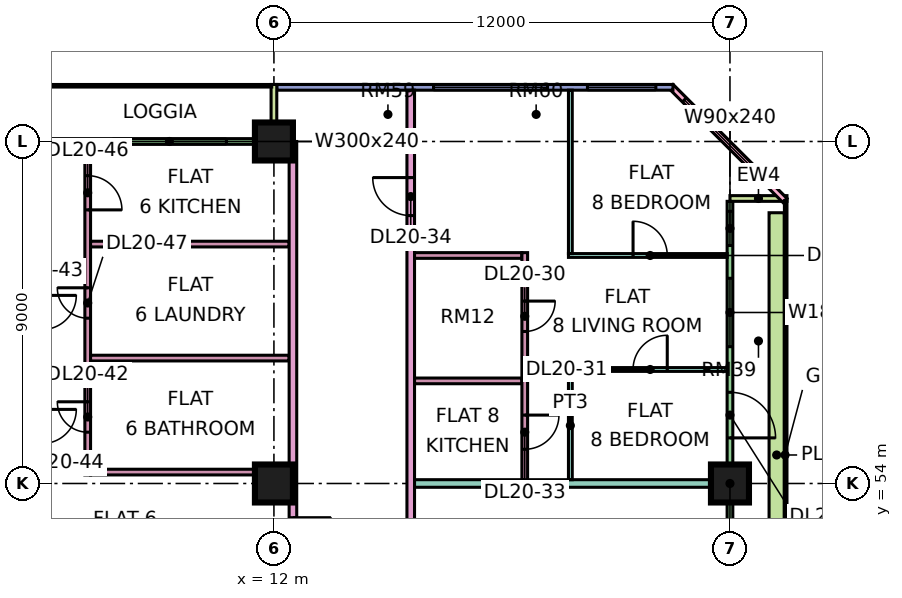
"""IFC4 building model, lengths in metres.
Left out: names, types, materials, properties, quantities, classifications, styles, units other than length and angle.
Written with IfcOpenShell. Run it as: python <this file> out.ifc"""

import sys

from ifc_helpers import new_model, si_unit, direction, frame, frame_2d, origin, origin_2d, place, context, subcontext, project, spatial, rectangle, extrude, element, fill, save


model = new_model("IFC4")
c1 = context("Model", 3, precision=1e-05, world=origin(), true_north=direction((0.0, 1.0)))
c2 = subcontext(c1, "Body", "Model", "MODEL_VIEW")
j1 = project(units=[si_unit("LENGTHUNIT", "METRE"), si_unit("PLANEANGLEUNIT", "RADIAN")], contexts=[c1])
p1 = place(None, origin())
s1 = spatial("IfcSite", under=j1, at=p1, CompositionType="ELEMENT")
p2 = place(p1, origin())
s2 = spatial("IfcBuilding", under=s1, at=p2, CompositionType="ELEMENT")
p3 = place(p2, frame((0.0, 0.0, 91.9)))
s3 = spatial("IfcBuildingStorey", under=s2, at=p3, CompositionType="ELEMENT", Elevation=91.9)
for number, where, z_axis, x_axis in (
    (1, (12.0, 54.0, 0.0), (0.0, 0.0, 1.0), (1.0, 0.0, 0.0)),
    (2, (12.0, 63.0, 0.0), (0.0, 0.0, 1.0), (1.0, 0.0, 0.0)),
    (3, (24.0, 54.0, 0.0), (0.0, 0.0, 1.0), (1.0, 0.0, 0.0)),
):
    element("IfcColumn", number, at=place(p3, frame(where, z_axis=z_axis, x_axis=x_axis)), inside=s3, PredefinedType="COLUMN", context=c2, shape_type="SweptSolid", body=[
        extrude(rectangle(XDim=1.0, YDim=1.0, at=origin_2d()), origin(), (0.0, 0.0, 1.0), 3.75),
    ])
p4 = place(p3, frame((24.0, 48.075, 0.0), z_axis=(0.0, 0.0, 1.0), x_axis=(0.0, 1.0, 0.0)))
e4 = element("IfcWall", 4, at=p4, inside=s3, PredefinedType="SOLIDWALL", context=c2, shape_type="SweptSolid", body=[
    extrude(rectangle(XDim=13.35, YDim=0.15, at=frame_2d((6.675, 0.0))), origin(), (0.0, 0.0, 1.0), 3.35),
])
p5 = place(p4, frame((0.562, 0.0, 0.45)))
e5 = element("IfcOpeningElement", 5, at=p5, cuts=e4, PredefinedType="OPENING", context=c2, shape_type="SweptSolid", body=[
    extrude(rectangle(XDim=4.2, YDim=2.4, at=frame_2d((2.1, 1.2))), frame((0.0, 0.085, 0.0), z_axis=(0.0, -1.0, 0.0), x_axis=(1.0, 0.0, 0.0)), (0.0, 0.0, 1.0), 0.17),
])
p6 = place(p4, frame((7.125, 0.0, 0.0)))
e6 = element("IfcOpeningElement", 6, at=p6, cuts=e4, PredefinedType="OPENING", context=c2, shape_type="SweptSolid", body=[
    extrude(rectangle(XDim=1.2, YDim=2.4, at=frame_2d((0.6, 1.2))), frame((0.0, 0.085, 0.0), z_axis=(0.0, -1.0, 0.0), x_axis=(1.0, 0.0, 0.0)), (0.0, 0.0, 1.0), 0.17),
])
p7 = place(p4, frame((9.525, 0.0, 0.45)))
e7 = element("IfcOpeningElement", 7, at=p7, cuts=e4, PredefinedType="OPENING", context=c2, shape_type="SweptSolid", body=[
    extrude(rectangle(XDim=1.8, YDim=2.4, at=frame_2d((0.9, 1.2))), frame((0.0, 0.085, 0.0), z_axis=(0.0, -1.0, 0.0), x_axis=(1.0, 0.0, 0.0)), (0.0, 0.0, 1.0), 0.17),
])
p8 = place(p4, frame((12.188, 0.0, 0.45)))
e8 = element("IfcOpeningElement", 8, at=p8, cuts=e4, PredefinedType="OPENING", context=c2, shape_type="SweptSolid", body=[
    extrude(rectangle(XDim=0.9, YDim=2.4, at=frame_2d((0.45, 1.2))), frame((0.0, 0.085, 0.0), z_axis=(0.0, -1.0, 0.0), x_axis=(1.0, 0.0, 0.0)), (0.0, 0.0, 1.0), 0.17),
])
p9 = place(p3, frame((25.5, 61.5, 0.0), z_axis=(0.0, 0.0, 1.0), x_axis=(-1.0, 0.0, 0.0)))
e9 = element("IfcWall", 9, at=p9, inside=s3, PredefinedType="SOLIDWALL", context=c2, shape_type="SweptSolid", body=[
    extrude(rectangle(XDim=1.5, YDim=0.15, at=frame_2d((0.75, 0.0))), origin(), (0.0, 0.0, 1.0), 3.35),
])
p10 = place(p3, frame((25.447, 61.447, 0.0), z_axis=(0.0, 0.0, 1.0), x_axis=(-0.707106781187, 0.707106781187, 0.0)))
e10 = element("IfcWall", 10, at=p10, inside=s3, PredefinedType="SOLIDWALL", context=c2, shape_type="SweptSolid", body=[
    extrude(rectangle(XDim=4.243, YDim=0.15, at=frame_2d((2.121, 0.0))), origin(), (0.0, 0.0, 1.0), 3.35),
])
p11 = place(p10, frame((0.744, 0.0, 0.45)))
e11 = element("IfcOpeningElement", 11, at=p11, cuts=e10, PredefinedType="OPENING", context=c2, shape_type="SweptSolid", body=[
    extrude(rectangle(XDim=3.0, YDim=2.4, at=frame_2d((1.5, 1.2))), frame((0.0, 0.085, 0.0), z_axis=(0.0, -1.0, 0.0), x_axis=(1.0, 0.0, 0.0)), (0.0, 0.0, 1.0), 0.17),
])
p12 = place(p3, frame((22.5, 64.425, 0.0), z_axis=(0.0, 0.0, 1.0), x_axis=(-1.0, 0.0, 0.0)))
e12 = element("IfcWall", 12, at=p12, inside=s3, PredefinedType="SOLIDWALL", context=c2, shape_type="SweptSolid", body=[
    extrude(rectangle(XDim=10.425, YDim=0.15, at=frame_2d((5.212, 0.0))), origin(), (0.0, 0.0, 1.0), 3.35),
])
p13 = place(p12, frame((0.45, 0.0, 0.45)))
e13 = element("IfcOpeningElement", 13, at=p13, cuts=e12, PredefinedType="OPENING", context=c2, shape_type="SweptSolid", body=[
    extrude(rectangle(XDim=1.8, YDim=2.4, at=frame_2d((0.9, 1.2))), frame((0.0, 0.085, 0.0), z_axis=(0.0, -1.0, 0.0), x_axis=(1.0, 0.0, 0.0)), (0.0, 0.0, 1.0), 0.17),
])
p14 = place(p12, frame((3.3, 0.0, 0.45)))
e14 = element("IfcOpeningElement", 14, at=p14, cuts=e12, PredefinedType="OPENING", context=c2, shape_type="SweptSolid", body=[
    extrude(rectangle(XDim=3.0, YDim=2.4, at=frame_2d((1.5, 1.2))), frame((0.0, 0.085, 0.0), z_axis=(0.0, -1.0, 0.0), x_axis=(1.0, 0.0, 0.0)), (0.0, 0.0, 1.0), 0.17),
])
p15 = place(p3, frame((11.925, 63.0, 0.0), z_axis=(0.0, 0.0, 1.0), x_axis=(-1.0, 0.0, 0.0)))
e15 = element("IfcWall", 15, at=p15, inside=s3, PredefinedType="SOLIDWALL", context=c2, shape_type="SweptSolid", body=[
    extrude(rectangle(XDim=10.35, YDim=0.15, at=frame_2d((5.175, 0.0))), origin(), (0.0, 0.0, 1.0), 3.35),
])
p16 = place(p15, frame((1.175, 0.0, 0.45)))
e16 = element("IfcOpeningElement", 16, at=p16, cuts=e15, PredefinedType="OPENING", context=c2, shape_type="SweptSolid", body=[
    extrude(rectangle(XDim=3.0, YDim=2.4, at=frame_2d((1.5, 1.2))), frame((0.0, 0.085, 0.0), z_axis=(0.0, -1.0, 0.0), x_axis=(1.0, 0.0, 0.0)), (0.0, 0.0, 1.0), 0.17),
])
p17 = place(p15, frame((6.688, 0.0, 0.0)))
e17 = element("IfcOpeningElement", 17, at=p17, cuts=e15, PredefinedType="OPENING", context=c2, shape_type="SweptSolid", body=[
    extrude(rectangle(XDim=1.8, YDim=2.4, at=frame_2d((0.9, 1.2))), frame((0.0, 0.085, 0.0), z_axis=(0.0, -1.0, 0.0), x_axis=(1.0, 0.0, 0.0)), (0.0, 0.0, 1.0), 0.17),
])
p18 = place(p3, frame((12.0, 64.5, 0.0), z_axis=(0.0, 0.0, 1.0), x_axis=(0.0, -1.0, 0.0)))
e18 = element("IfcWall", 18, at=p18, inside=s3, PredefinedType="SOLIDWALL", context=c2, shape_type="SweptSolid", body=[
    extrude(rectangle(XDim=1.5, YDim=0.15, at=frame_2d((0.75, 0.0))), origin(), (0.0, 0.0, 1.0), 3.35),
])
p19 = place(p3, frame((25.229, 48.375, 0.0), z_axis=(0.0, 0.0, 1.0), x_axis=(0.0, 1.0, 0.0)))
e19 = element("IfcWall", 19, at=p19, inside=s3, PredefinedType="SOLIDWALL", context=c2, shape_type="SweptSolid", body=[
    extrude(rectangle(XDim=12.75, YDim=0.4, at=frame_2d((6.375, 0.0))), origin(), (0.0, 0.0, 1.0), 0.7),
])
p20 = place(p3, frame((7.1, 54.225, 0.0), z_axis=(0.0, 0.0, 1.0), x_axis=(0.0, 1.0, 0.0)))
e20 = element("IfcWall", 20, at=p20, inside=s3, PredefinedType="PARTITIONING", context=c2, shape_type="SweptSolid", body=[
    extrude(rectangle(XDim=8.701, YDim=0.15, at=frame_2d((4.351, 0.0))), origin(), (0.0, 0.0, 1.0), 3.35),
])
p21 = place(p20, frame((1.125, 0.0, 0.0)))
e21 = element("IfcOpeningElement", 21, at=p21, cuts=e20, PredefinedType="OPENING", context=c2, shape_type="SweptSolid", body=[
    extrude(rectangle(XDim=0.8, YDim=2.1, at=frame_2d((0.4, 1.05))), frame((0.0, 0.085, 0.0), z_axis=(0.0, -1.0, 0.0), x_axis=(1.0, 0.0, 0.0)), (0.0, 0.0, 1.0), 0.17),
])
p22 = place(p20, frame((6.975, 0.0, 0.0)))
e22 = element("IfcOpeningElement", 22, at=p22, cuts=e20, PredefinedType="OPENING", context=c2, shape_type="SweptSolid", body=[
    extrude(rectangle(XDim=0.9, YDim=2.1, at=frame_2d((0.45, 1.05))), frame((0.0, 0.085, 0.0), z_axis=(0.0, -1.0, 0.0), x_axis=(1.0, 0.0, 0.0)), (0.0, 0.0, 1.0), 0.17),
])
p23 = place(p20, frame((4.125, 0.0, 0.0)))
e23 = element("IfcOpeningElement", 23, at=p23, cuts=e20, PredefinedType="OPENING", context=c2, shape_type="SweptSolid", body=[
    extrude(rectangle(XDim=0.8, YDim=2.1, at=frame_2d((0.4, 1.05))), frame((0.0, 0.085, 0.0), z_axis=(0.0, -1.0, 0.0), x_axis=(1.0, 0.0, 0.0)), (0.0, 0.0, 1.0), 0.17),
])
for number, where, z_axis, x_axis in (
    (24, (7.175, 54.3, 0.0), (0.0, 0.0, 1.0), (1.0, 0.0, 0.0)),
    (25, (7.175, 57.3, 0.0), (0.0, 0.0, 1.0), (1.0, 0.0, 0.0)),
    (26, (7.175, 60.3, 0.0), (0.0, 0.0, 1.0), (1.0, 0.0, 0.0)),
):
    element("IfcWall", number, at=place(p3, frame(where, z_axis=z_axis, x_axis=x_axis)), inside=s3, PredefinedType="PARTITIONING", context=c2, shape_type="SweptSolid", body=[
        extrude(rectangle(XDim=5.225, YDim=0.15, at=frame_2d((2.612, 0.0))), origin(), (0.0, 0.0, 1.0), 3.35),
    ])
p24 = place(p3, frame((12.5, 20.0, 0.0), z_axis=(0.0, 0.0, 1.0), x_axis=(0.0, 1.0, 0.0)))
e27 = element("IfcWall", 27, at=p24, inside=s3, PredefinedType="PARTITIONING", context=c2, shape_type="SweptSolid", body=[
    extrude(rectangle(XDim=43.0, YDim=0.2, at=frame_2d((21.5, 0.0))), origin(), (0.0, 0.0, 1.0), 3.35),
])
p25 = place(p24, frame((28.65, 0.0, 0.0)))
e28 = element("IfcOpeningElement", 28, at=p25, cuts=e27, PredefinedType="OPENING", context=c2, shape_type="SweptSolid", body=[
    extrude(rectangle(XDim=1.0, YDim=2.1, at=frame_2d((0.5, 1.05))), frame((0.0, 0.11, 0.0), z_axis=(0.0, -1.0, 0.0), x_axis=(1.0, 0.0, 0.0)), (0.0, 0.0, 1.0), 0.22),
])
p26 = place(p24, frame((32.1, 0.0, 0.0)))
e29 = element("IfcOpeningElement", 29, at=p26, cuts=e27, PredefinedType="OPENING", context=c2, shape_type="SweptSolid", body=[
    extrude(rectangle(XDim=1.0, YDim=2.1, at=frame_2d((0.5, 1.05))), frame((0.0, 0.11, 0.0), z_axis=(0.0, -1.0, 0.0), x_axis=(1.0, 0.0, 0.0)), (0.0, 0.0, 1.0), 0.22),
])
p27 = place(p24, frame((0.6, 0.0, 0.0)))
e30 = element("IfcOpeningElement", 30, at=p27, cuts=e27, PredefinedType="OPENING", context=c2, shape_type="SweptSolid", body=[
    extrude(rectangle(XDim=1.2, YDim=2.1, at=frame_2d((0.6, 1.05))), frame((0.0, 0.11, 0.0), z_axis=(0.0, -1.0, 0.0), x_axis=(1.0, 0.0, 0.0)), (0.0, 0.0, 1.0), 0.22),
])
p28 = place(p24, frame((11.1, 0.0, 0.0)))
e31 = element("IfcOpeningElement", 31, at=p28, cuts=e27, PredefinedType="OPENING", context=c2, shape_type="SweptSolid", body=[
    extrude(rectangle(XDim=1.0, YDim=2.1, at=frame_2d((0.5, 1.05))), frame((0.0, 0.11, 0.0), z_axis=(0.0, -1.0, 0.0), x_axis=(1.0, 0.0, 0.0)), (0.0, 0.0, 1.0), 0.22),
])
p29 = place(p3, frame((15.6, 51.225, 0.0), z_axis=(0.0, 0.0, 1.0), x_axis=(0.0, 1.0, 0.0)))
e32 = element("IfcWall", 32, at=p29, inside=s3, PredefinedType="PARTITIONING", context=c2, shape_type="SweptSolid", body=[
    extrude(rectangle(XDim=13.125, YDim=0.2, at=frame_2d((6.562, 0.0))), origin(), (0.0, 0.0, 1.0), 3.35),
])
p30 = place(p29, frame((9.825, 0.0, 0.0)))
e33 = element("IfcOpeningElement", 33, at=p30, cuts=e32, PredefinedType="OPENING", context=c2, shape_type="SweptSolid", body=[
    extrude(rectangle(XDim=1.0, YDim=2.1, at=frame_2d((0.5, 1.05))), frame((0.0, 0.11, 0.0), z_axis=(0.0, -1.0, 0.0), x_axis=(1.0, 0.0, 0.0)), (0.0, 0.0, 1.0), 0.22),
])
p31 = place(p3, frame((15.7, 54.0, 0.0), z_axis=(0.0, 0.0, 1.0), x_axis=(1.0, 0.0, 0.0)))
e34 = element("IfcWall", 34, at=p31, inside=s3, PredefinedType="PARTITIONING", context=c2, shape_type="SweptSolid", body=[
    extrude(rectangle(XDim=8.226, YDim=0.2, at=frame_2d((4.113, 0.0))), origin(), (0.0, 0.0, 1.0), 3.35),
])
for number, where, z_axis, x_axis in (
    (35, (15.7, 56.7, 0.0), (0.0, 0.0, 1.0), (1.0, 0.0, 0.0)),
    (36, (15.7, 60.0, 0.0), (0.0, 0.0, 1.0), (1.0, 0.0, 0.0)),
):
    element("IfcWall", number, at=place(p3, frame(where, z_axis=z_axis, x_axis=x_axis)), inside=s3, PredefinedType="PARTITIONING", context=c2, shape_type="SweptSolid", body=[
        extrude(rectangle(XDim=2.825, YDim=0.15, at=frame_2d((1.413, 0.0))), origin(), (0.0, 0.0, 1.0), 3.35),
    ])
p32 = place(p3, frame((18.6, 54.1, 0.0), z_axis=(0.0, 0.0, 1.0), x_axis=(0.0, 1.0, 0.0)))
e37 = element("IfcWall", 37, at=p32, inside=s3, PredefinedType="PARTITIONING", context=c2, shape_type="SweptSolid", body=[
    extrude(rectangle(XDim=5.975, YDim=0.15, at=frame_2d((2.987, 0.0))), origin(), (0.0, 0.0, 1.0), 3.35),
])
p33 = place(p32, frame((3.9, 0.0, 0.0)))
e38 = element("IfcOpeningElement", 38, at=p33, cuts=e37, PredefinedType="OPENING", context=c2, shape_type="SweptSolid", body=[
    extrude(rectangle(XDim=0.8, YDim=2.1, at=frame_2d((0.4, 1.05))), frame((0.0, 0.085, 0.0), z_axis=(0.0, -1.0, 0.0), x_axis=(1.0, 0.0, 0.0)), (0.0, 0.0, 1.0), 0.17),
])
p34 = place(p32, frame((0.8, 0.0, 0.0)))
e39 = element("IfcOpeningElement", 39, at=p34, cuts=e37, PredefinedType="OPENING", context=c2, shape_type="SweptSolid", body=[
    extrude(rectangle(XDim=0.9, YDim=2.1, at=frame_2d((0.45, 1.05))), frame((0.0, 0.085, 0.0), z_axis=(0.0, -1.0, 0.0), x_axis=(1.0, 0.0, 0.0)), (0.0, 0.0, 1.0), 0.17),
])
p35 = place(p3, frame((19.75, 57.0, 0.0), z_axis=(0.0, 0.0, 1.0), x_axis=(1.0, 0.0, 0.0)))
e40 = element("IfcWall", 40, at=p35, inside=s3, PredefinedType="PARTITIONING", context=c2, shape_type="SweptSolid", body=[
    extrude(rectangle(XDim=4.176, YDim=0.1, at=frame_2d((2.088, 0.0))), origin(), (0.0, 0.0, 1.0), 3.35),
])
p36 = place(p35, frame((1.7, 0.0, 0.0)))
e41 = element("IfcOpeningElement", 41, at=p36, cuts=e40, PredefinedType="OPENING", context=c2, shape_type="SweptSolid", body=[
    extrude(rectangle(XDim=0.9, YDim=2.1, at=frame_2d((0.45, 1.05))), frame((0.0, 0.06, 0.0), z_axis=(0.0, -1.0, 0.0), x_axis=(1.0, 0.0, 0.0)), (0.0, 0.0, 1.0), 0.12),
])
p37 = place(p3, frame((19.75, 60.0, 0.0), z_axis=(0.0, 0.0, 1.0), x_axis=(1.0, 0.0, 0.0)))
e42 = element("IfcWall", 42, at=p37, inside=s3, PredefinedType="PARTITIONING", context=c2, shape_type="SweptSolid", body=[
    extrude(rectangle(XDim=4.176, YDim=0.1, at=frame_2d((2.088, 0.0))), origin(), (0.0, 0.0, 1.0), 3.35),
])
p38 = place(p37, frame((1.7, 0.0, 0.0)))
e43 = element("IfcOpeningElement", 43, at=p38, cuts=e42, PredefinedType="OPENING", context=c2, shape_type="SweptSolid", body=[
    extrude(rectangle(XDim=0.9, YDim=2.1, at=frame_2d((0.45, 1.05))), frame((0.0, 0.06, 0.0), z_axis=(0.0, -1.0, 0.0), x_axis=(1.0, 0.0, 0.0)), (0.0, 0.0, 1.0), 0.12),
])
p39 = place(p3, frame((19.8, 54.1, 0.0), z_axis=(0.0, 0.0, 1.0), x_axis=(0.0, 1.0, 0.0)))
e44 = element("IfcWall", 44, at=p39, inside=s3, PredefinedType="PARTITIONING", context=c2, shape_type="SweptSolid", body=[
    extrude(rectangle(XDim=2.85, YDim=0.1, at=frame_2d((1.425, 0.0))), origin(), (0.0, 0.0, 1.0), 3.35),
])
p40 = place(p3, frame((19.8, 60.05, 0.0), z_axis=(0.0, 0.0, 1.0), x_axis=(0.0, 1.0, 0.0)))
e45 = element("IfcWall", 45, at=p40, inside=s3, PredefinedType="PARTITIONING", context=c2, shape_type="SweptSolid", body=[
    extrude(rectangle(XDim=4.3, YDim=0.1, at=frame_2d((2.15, 0.0))), origin(), (0.0, 0.0, 1.0), 3.35),
])
p41 = place(p6, frame((1.2, 0.0, 0.0), z_axis=(0.0, 0.0, 1.0), x_axis=(-1.0, 0.0, 0.0)))
e46 = element("IfcDoor", 46, at=p41, inside=s3, OperationType="DOUBLE_DOOR_SINGLE_SWING", PredefinedType="DOOR", context=c2, shape_type="SweptSolid", body=[
    extrude(rectangle(XDim=1.2, YDim=2.4, at=frame_2d((0.6, 1.2))), frame((0.0, 0.025, 0.0), z_axis=(0.0, -1.0, 0.0), x_axis=(1.0, 0.0, 0.0)), (0.0, 0.0, 1.0), 0.05),
])
fill(e6, e46)
p42 = place(p7, origin())
e47 = element("IfcWindow", 47, at=p42, inside=s3, PartitioningType="SINGLE_PANEL", PredefinedType="WINDOW", context=c2, shape_type="SweptSolid", body=[
    extrude(rectangle(XDim=1.8, YDim=2.4, at=frame_2d((0.9, 1.2))), frame((0.0, 0.03, 0.0), z_axis=(0.0, -1.0, 0.0), x_axis=(1.0, 0.0, 0.0)), (0.0, 0.0, 1.0), 0.06),
])
fill(e7, e47)
p43 = place(p8, origin())
e48 = element("IfcWindow", 48, at=p43, inside=s3, PartitioningType="SINGLE_PANEL", PredefinedType="WINDOW", context=c2, shape_type="SweptSolid", body=[
    extrude(rectangle(XDim=0.9, YDim=2.4, at=frame_2d((0.45, 1.2))), frame((0.0, 0.03, 0.0), z_axis=(0.0, -1.0, 0.0), x_axis=(1.0, 0.0, 0.0)), (0.0, 0.0, 1.0), 0.06),
])
fill(e8, e48)
p44 = place(p11, origin())
e49 = element("IfcWindow", 49, at=p44, inside=s3, PartitioningType="SINGLE_PANEL", PredefinedType="WINDOW", context=c2, shape_type="SweptSolid", body=[
    extrude(rectangle(XDim=3.0, YDim=2.4, at=frame_2d((1.5, 1.2))), frame((0.0, 0.03, 0.0), z_axis=(0.0, -1.0, 0.0), x_axis=(1.0, 0.0, 0.0)), (0.0, 0.0, 1.0), 0.06),
])
fill(e11, e49)
p45 = place(p13, origin())
e50 = element("IfcWindow", 50, at=p45, inside=s3, PartitioningType="SINGLE_PANEL", PredefinedType="WINDOW", context=c2, shape_type="SweptSolid", body=[
    extrude(rectangle(XDim=1.8, YDim=2.4, at=frame_2d((0.9, 1.2))), frame((0.0, 0.03, 0.0), z_axis=(0.0, -1.0, 0.0), x_axis=(1.0, 0.0, 0.0)), (0.0, 0.0, 1.0), 0.06),
])
fill(e13, e50)
p46 = place(p14, origin())
e51 = element("IfcWindow", 51, at=p46, inside=s3, PartitioningType="SINGLE_PANEL", PredefinedType="WINDOW", context=c2, shape_type="SweptSolid", body=[
    extrude(rectangle(XDim=3.0, YDim=2.4, at=frame_2d((1.5, 1.2))), frame((0.0, 0.03, 0.0), z_axis=(0.0, -1.0, 0.0), x_axis=(1.0, 0.0, 0.0)), (0.0, 0.0, 1.0), 0.06),
])
fill(e14, e51)
p47 = place(p16, origin())
e52 = element("IfcWindow", 52, at=p47, inside=s3, PartitioningType="SINGLE_PANEL", PredefinedType="WINDOW", context=c2, shape_type="SweptSolid", body=[
    extrude(rectangle(XDim=3.0, YDim=2.4, at=frame_2d((1.5, 1.2))), frame((0.0, 0.03, 0.0), z_axis=(0.0, -1.0, 0.0), x_axis=(1.0, 0.0, 0.0)), (0.0, 0.0, 1.0), 0.06),
])
fill(e16, e52)
p48 = place(p33, origin())
e53 = element("IfcDoor", 53, at=p48, inside=s3, OperationType="SINGLE_SWING_RIGHT", PredefinedType="DOOR", context=c2, shape_type="SweptSolid", body=[
    extrude(rectangle(XDim=0.8, YDim=2.1, at=frame_2d((0.4, 1.05))), frame((0.0, 0.025, 0.0), z_axis=(0.0, -1.0, 0.0), x_axis=(1.0, 0.0, 0.0)), (0.0, 0.0, 1.0), 0.05),
])
fill(e38, e53)
p49 = place(p36, frame((0.9, 0.0, 0.0), z_axis=(0.0, 0.0, 1.0), x_axis=(-1.0, 0.0, 0.0)))
e54 = element("IfcDoor", 54, at=p49, inside=s3, OperationType="SINGLE_SWING_RIGHT", PredefinedType="DOOR", context=c2, shape_type="SweptSolid", body=[
    extrude(rectangle(XDim=0.9, YDim=2.1, at=frame_2d((0.45, 1.05))), frame((0.0, 0.025, 0.0), z_axis=(0.0, -1.0, 0.0), x_axis=(1.0, 0.0, 0.0)), (0.0, 0.0, 1.0), 0.05),
])
fill(e41, e54)
p50 = place(p38, origin())
e55 = element("IfcDoor", 55, at=p50, inside=s3, OperationType="SINGLE_SWING_LEFT", PredefinedType="DOOR", context=c2, shape_type="SweptSolid", body=[
    extrude(rectangle(XDim=0.9, YDim=2.1, at=frame_2d((0.45, 1.05))), frame((0.0, 0.025, 0.0), z_axis=(0.0, -1.0, 0.0), x_axis=(1.0, 0.0, 0.0)), (0.0, 0.0, 1.0), 0.05),
])
fill(e43, e55)
p51 = place(p34, origin())
e56 = element("IfcDoor", 56, at=p51, inside=s3, OperationType="SINGLE_SWING_RIGHT", PredefinedType="DOOR", context=c2, shape_type="SweptSolid", body=[
    extrude(rectangle(XDim=0.9, YDim=2.1, at=frame_2d((0.45, 1.05))), frame((0.0, 0.025, 0.0), z_axis=(0.0, -1.0, 0.0), x_axis=(1.0, 0.0, 0.0)), (0.0, 0.0, 1.0), 0.05),
])
fill(e39, e56)
p52 = place(p30, frame((1.0, 0.0, 0.0), z_axis=(0.0, 0.0, 1.0), x_axis=(-1.0, 0.0, 0.0)))
e57 = element("IfcDoor", 57, at=p52, inside=s3, OperationType="SINGLE_SWING_RIGHT", PredefinedType="DOOR", context=c2, shape_type="SweptSolid", body=[
    extrude(rectangle(XDim=1.0, YDim=2.1, at=frame_2d((0.5, 1.05))), frame((0.0, 0.025, 0.0), z_axis=(0.0, -1.0, 0.0), x_axis=(1.0, 0.0, 0.0)), (0.0, 0.0, 1.0), 0.05),
])
fill(e33, e57)
p53 = place(p21, frame((0.8, 0.0, 0.0), z_axis=(0.0, 0.0, 1.0), x_axis=(-1.0, 0.0, 0.0)))
e58 = element("IfcDoor", 58, at=p53, inside=s3, OperationType="SINGLE_SWING_RIGHT", PredefinedType="DOOR", context=c2, shape_type="SweptSolid", body=[
    extrude(rectangle(XDim=0.8, YDim=2.1, at=frame_2d((0.4, 1.05))), frame((0.0, 0.025, 0.0), z_axis=(0.0, -1.0, 0.0), x_axis=(1.0, 0.0, 0.0)), (0.0, 0.0, 1.0), 0.05),
])
fill(e21, e58)
p54 = place(p22, frame((0.9, 0.0, 0.0), z_axis=(0.0, 0.0, 1.0), x_axis=(-1.0, 0.0, 0.0)))
e59 = element("IfcDoor", 59, at=p54, inside=s3, OperationType="SINGLE_SWING_LEFT", PredefinedType="DOOR", context=c2, shape_type="SweptSolid", body=[
    extrude(rectangle(XDim=0.9, YDim=2.1, at=frame_2d((0.45, 1.05))), frame((0.0, 0.025, 0.0), z_axis=(0.0, -1.0, 0.0), x_axis=(1.0, 0.0, 0.0)), (0.0, 0.0, 1.0), 0.05),
])
fill(e22, e59)
p55 = place(p23, frame((0.8, 0.0, 0.0), z_axis=(0.0, 0.0, 1.0), x_axis=(-1.0, 0.0, 0.0)))
e60 = element("IfcDoor", 60, at=p55, inside=s3, OperationType="SINGLE_SWING_RIGHT", PredefinedType="DOOR", context=c2, shape_type="SweptSolid", body=[
    extrude(rectangle(XDim=0.8, YDim=2.1, at=frame_2d((0.4, 1.05))), frame((0.0, 0.025, 0.0), z_axis=(0.0, -1.0, 0.0), x_axis=(1.0, 0.0, 0.0)), (0.0, 0.0, 1.0), 0.05),
])
fill(e23, e60)
p56 = place(p26, origin())
e61 = element("IfcDoor", 61, at=p56, inside=s3, OperationType="SINGLE_SWING_RIGHT", PredefinedType="DOOR", context=c2, shape_type="SweptSolid", body=[
    extrude(rectangle(XDim=1.0, YDim=2.1, at=frame_2d((0.5, 1.05))), frame((0.0, 0.025, 0.0), z_axis=(0.0, -1.0, 0.0), x_axis=(1.0, 0.0, 0.0)), (0.0, 0.0, 1.0), 0.05),
])
fill(e29, e61)
save(model, sys.argv[1])
